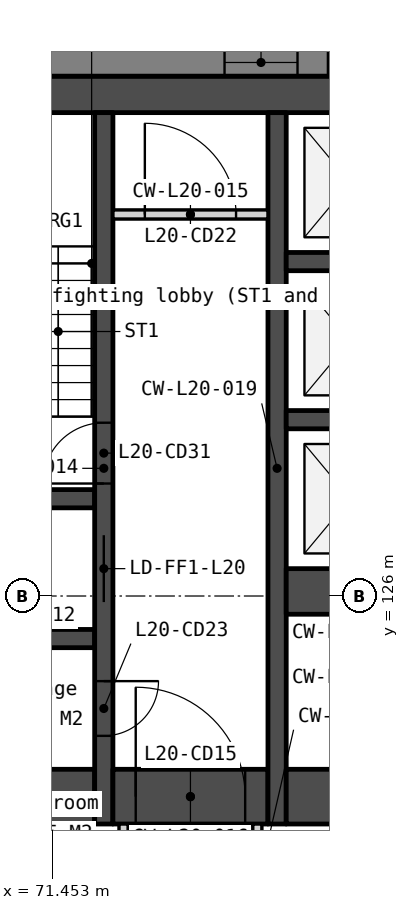
"""IFC4 building model, lengths in metres.
Left out: names, types, materials, properties, quantities, classifications, styles, units other than length and angle.
Written with IfcOpenShell. Run it as: python <this file> out.ifc"""

import sys

from ifc_helpers import new_model, si_unit, direction, frame, frame_2d, origin, place, context, subcontext, project, spatial, polyline, rectangle, outline, extrude, element, fill, save


model = new_model("IFC4")
c1 = context("Model", 3, precision=1e-05, world=origin(), true_north=direction((0.0, 1.0)))
c2 = subcontext(c1, "Body", "Model", "MODEL_VIEW")
j1 = project(units=[si_unit("LENGTHUNIT", "METRE"), si_unit("PLANEANGLEUNIT", "RADIAN")], contexts=[c1])
p1 = place(None, origin())
s1 = spatial("IfcSite", under=j1, at=p1, CompositionType="ELEMENT")
p2 = place(p1, origin())
s2 = spatial("IfcBuilding", under=s1, at=p2, CompositionType="ELEMENT")
p3 = place(p2, frame((0.0, 0.0, 85.3)))
s3 = spatial("IfcBuildingStorey", under=s2, at=p3, CompositionType="ELEMENT", Elevation=85.3)
p4 = place(p3, frame((66.0, 134.25, 0.0), z_axis=(0.0, 0.0, 1.0), x_axis=(1.0, 0.0, 0.0)))
e1 = element("IfcWall", 1, at=p4, inside=s3, PredefinedType="SOLIDWALL", context=c2, shape_type="SweptSolid", body=[
    extrude(rectangle(XDim=28.0, YDim=0.6, at=frame_2d((14.0, 0.0))), origin(), (0.0, 0.0, 1.0), 3.35),
])
for number, where, z_axis, x_axis in (
    (2, (69.6, 127.6, 0.0), (0.0, 0.0, 1.0), (1.0, 0.0, 0.0)),
    (3, (69.6, 125.3, 0.0), (0.0, 0.0, 1.0), (1.0, 0.0, 0.0)),
):
    element("IfcWall", number, at=place(p3, frame(where, z_axis=z_axis, x_axis=x_axis)), inside=s3, PredefinedType="SOLIDWALL", context=c2, shape_type="SweptSolid", body=[
        extrude(rectangle(XDim=2.55, YDim=0.3, at=frame_2d((1.275, 0.0))), origin(), (0.0, 0.0, 1.0), 3.35),
    ])
p5 = place(p3, frame((69.6, 122.7, 0.0), z_axis=(0.0, 0.0, 1.0), x_axis=(1.0, 0.0, 0.0)))
e4 = element("IfcWall", 4, at=p5, inside=s3, PredefinedType="SOLIDWALL", context=c2, shape_type="SweptSolid", body=[
    extrude(rectangle(XDim=2.55, YDim=0.9, at=frame_2d((1.275, 0.0))), origin(), (0.0, 0.0, 1.0), 3.35),
])
p6 = place(p3, frame((72.3, 133.95, 0.0), z_axis=(0.0, 0.0, 1.0), x_axis=(0.0, -1.0, 0.0)))
e5 = element("IfcWall", 5, at=p6, inside=s3, PredefinedType="SOLIDWALL", context=c2, shape_type="SweptSolid", body=[
    extrude(rectangle(XDim=11.7, YDim=0.3, at=frame_2d((5.85, 0.0))), origin(), (0.0, 0.0, 1.0), 3.35),
])
p7 = place(p6, frame((6.95, 0.0, 0.0)))
e6 = element("IfcOpeningElement", 6, at=p7, cuts=e5, PredefinedType="OPENING", context=c2, shape_type="SweptSolid", body=[
    extrude(rectangle(XDim=1.1, YDim=2.1, at=frame_2d((0.55, 1.05))), frame((0.0, 0.16, 0.0), z_axis=(0.0, -1.0, 0.0), x_axis=(1.0, 0.0, 0.0)), (0.0, 0.0, 1.0), 0.32),
])
p8 = place(p6, frame((9.35, 0.0, 0.0)))
e7 = element("IfcOpeningElement", 7, at=p8, cuts=e5, PredefinedType="OPENING", context=c2, shape_type="SweptSolid", body=[
    extrude(rectangle(XDim=0.9, YDim=2.1, at=frame_2d((0.45, 1.05))), frame((0.0, 0.16, 0.0), z_axis=(0.0, -1.0, 0.0), x_axis=(1.0, 0.0, 0.0)), (0.0, 0.0, 1.0), 0.32),
])
p9 = place(p6, frame((5.1, 0.0, 0.0)))
e8 = element("IfcOpeningElement", 8, at=p9, cuts=e5, PredefinedType="OPENING", context=c2, shape_type="SweptSolid", body=[
    extrude(rectangle(XDim=1.0, YDim=2.1, at=frame_2d((0.5, 1.05))), frame((0.0, 0.16, 0.0), z_axis=(0.0, -1.0, 0.0), x_axis=(1.0, 0.0, 0.0)), (0.0, 0.0, 1.0), 0.32),
])
p10 = place(p3, frame((72.45, 132.275, 0.0), z_axis=(0.0, 0.0, 1.0), x_axis=(1.0, 0.0, 0.0)))
e9 = element("IfcWall", 9, at=p10, inside=s3, PredefinedType="PARTITIONING", context=c2, shape_type="SweptSolid", body=[
    extrude(rectangle(XDim=2.55, YDim=0.15, at=frame_2d((1.275, 0.0))), origin(), (0.0, 0.0, 1.0), 3.35),
])
p11 = place(p10, frame((0.525, 0.0, 0.0)))
e10 = element("IfcOpeningElement", 10, at=p11, cuts=e9, PredefinedType="OPENING", context=c2, shape_type="SweptSolid", body=[
    extrude(rectangle(XDim=1.5, YDim=2.1, at=frame_2d((0.75, 1.05))), frame((0.0, 0.085, 0.0), z_axis=(0.0, -1.0, 0.0), x_axis=(1.0, 0.0, 0.0)), (0.0, 0.0, 1.0), 0.17),
])
p12 = place(p3, frame((72.45, 122.7, 0.0), z_axis=(0.0, 0.0, 1.0), x_axis=(1.0, 0.0, 0.0)))
e11 = element("IfcWall", 11, at=p12, inside=s3, PredefinedType="SOLIDWALL", context=c2, shape_type="SweptSolid", body=[
    extrude(rectangle(XDim=2.55, YDim=0.9, at=frame_2d((1.275, 0.0))), origin(), (0.0, 0.0, 1.0), 3.35),
])
p13 = place(p12, frame((0.375, 0.0, 0.0)))
e12 = element("IfcOpeningElement", 12, at=p13, cuts=e11, PredefinedType="OPENING", context=c2, shape_type="SweptSolid", body=[
    extrude(rectangle(XDim=1.8, YDim=2.1, at=frame_2d((0.9, 1.05))), frame((0.0, 0.46, 0.0), z_axis=(0.0, -1.0, 0.0), x_axis=(1.0, 0.0, 0.0)), (0.0, 0.0, 1.0), 0.92),
])
for number, where, z_axis, x_axis in (
    (13, (72.625, 122.25, 0.0), (0.0, 0.0, 1.0), (0.0, -1.0, 0.0)),
    (14, (74.825, 122.25, 0.0), (0.0, 0.0, 1.0), (0.0, -1.0, 0.0)),
):
    element("IfcWall", number, at=place(p3, frame(where, z_axis=z_axis, x_axis=x_axis)), inside=s3, PredefinedType="PARTITIONING", context=c2, shape_type="SweptSolid", body=[
        extrude(rectangle(XDim=2.1, YDim=0.15, at=frame_2d((1.05, 0.0))), origin(), (0.0, 0.0, 1.0), 3.35),
    ])
p14 = place(p3, frame((75.15, 133.95, 0.0), z_axis=(0.0, 0.0, 1.0), x_axis=(0.0, -1.0, 0.0)))
e15 = element("IfcWall", 15, at=p14, inside=s3, PredefinedType="SOLIDWALL", context=c2, shape_type="SweptSolid", body=[
    extrude(rectangle(XDim=11.7, YDim=0.3, at=frame_2d((5.85, 0.0))), origin(), (0.0, 0.0, 1.0), 3.35),
])
for number, where, z_axis, x_axis in (
    (16, (75.3, 131.5, 0.0), (0.0, 0.0, 1.0), (1.0, 0.0, 0.0)),
    (17, (75.3, 128.9, 0.0), (0.0, 0.0, 1.0), (1.0, 0.0, 0.0)),
):
    element("IfcWall", number, at=place(p3, frame(where, z_axis=z_axis, x_axis=x_axis)), inside=s3, PredefinedType="SOLIDWALL", context=c2, shape_type="SweptSolid", body=[
        extrude(rectangle(XDim=2.1, YDim=0.3, at=frame_2d((1.05, 0.0))), origin(), (0.0, 0.0, 1.0), 3.35),
    ])
p15 = place(p3, frame((75.3, 126.075, 0.0), z_axis=(0.0, 0.0, 1.0), x_axis=(1.0, 0.0, 0.0)))
e18 = element("IfcWall", 18, at=p15, inside=s3, PredefinedType="SOLIDWALL", context=c2, shape_type="SweptSolid", body=[
    extrude(rectangle(XDim=2.1, YDim=0.75, at=frame_2d((1.05, 0.0))), origin(), (0.0, 0.0, 1.0), 3.35),
])
p16 = place(p3, frame((75.3, 122.7, 0.0), z_axis=(0.0, 0.0, 1.0), x_axis=(1.0, 0.0, 0.0)))
e19 = element("IfcWall", 19, at=p16, inside=s3, PredefinedType="SOLIDWALL", context=c2, shape_type="SweptSolid", body=[
    extrude(rectangle(XDim=6.2, YDim=0.9, at=frame_2d((3.1, 0.0))), origin(), (0.0, 0.0, 1.0), 3.35),
])
p17 = place(p3, frame((101.322, 134.775, -0.15), z_axis=(0.0, 0.0, 1.0), x_axis=(-1.0, 0.0, 0.0)))
e20 = element("IfcWall", 20, at=p17, inside=s3, PredefinedType="SOLIDWALL", context=c2, shape_type="SweptSolid", body=[
    extrude(outline(polyline([(42.643, 0.0), (42.643, 3.5), (0.0, 3.5), (0.0, 0.0), (42.643, 0.0)])), frame((0.0, 0.225, 0.0), z_axis=(0.0, -1.0, 0.0), x_axis=(1.0, 0.0, 0.0)), (0.0, 0.0, 1.0), 0.45),
])
p18 = place(p17, frame((7.079, 0.0, 1.05)))
e21 = element("IfcOpeningElement", 21, at=p18, cuts=e20, PredefinedType="OPENING", context=c2, shape_type="SweptSolid", body=[
    extrude(rectangle(XDim=1.2, YDim=1.5, at=frame_2d((0.6, 0.75))), frame((0.0, 0.235, 0.0), z_axis=(0.0, -1.0, 0.0), x_axis=(1.0, 0.0, 0.0)), (0.0, 0.0, 1.0), 0.47),
])
p19 = place(p17, frame((8.779, 0.0, 1.05)))
e22 = element("IfcOpeningElement", 22, at=p19, cuts=e20, PredefinedType="OPENING", context=c2, shape_type="SweptSolid", body=[
    extrude(rectangle(XDim=1.2, YDim=1.5, at=frame_2d((0.6, 0.75))), frame((0.0, 0.235, 0.0), z_axis=(0.0, -1.0, 0.0), x_axis=(1.0, 0.0, 0.0)), (0.0, 0.0, 1.0), 0.47),
])
p20 = place(p17, frame((15.607, 0.0, 1.05)))
e23 = element("IfcOpeningElement", 23, at=p20, cuts=e20, PredefinedType="OPENING", context=c2, shape_type="SweptSolid", body=[
    extrude(rectangle(XDim=1.2, YDim=1.5, at=frame_2d((0.6, 0.75))), frame((0.0, 0.235, 0.0), z_axis=(0.0, -1.0, 0.0), x_axis=(1.0, 0.0, 0.0)), (0.0, 0.0, 1.0), 0.47),
])
p21 = place(p17, frame((17.307, 0.0, 1.05)))
e24 = element("IfcOpeningElement", 24, at=p21, cuts=e20, PredefinedType="OPENING", context=c2, shape_type="SweptSolid", body=[
    extrude(rectangle(XDim=1.2, YDim=1.5, at=frame_2d((0.6, 0.75))), frame((0.0, 0.235, 0.0), z_axis=(0.0, -1.0, 0.0), x_axis=(1.0, 0.0, 0.0)), (0.0, 0.0, 1.0), 0.47),
])
p22 = place(p17, frame((24.136, 0.0, 1.05)))
e25 = element("IfcOpeningElement", 25, at=p22, cuts=e20, PredefinedType="OPENING", context=c2, shape_type="SweptSolid", body=[
    extrude(rectangle(XDim=1.2, YDim=1.5, at=frame_2d((0.6, 0.75))), frame((0.0, 0.235, 0.0), z_axis=(0.0, -1.0, 0.0), x_axis=(1.0, 0.0, 0.0)), (0.0, 0.0, 1.0), 0.47),
])
p23 = place(p17, frame((25.836, 0.0, 1.05)))
e26 = element("IfcOpeningElement", 26, at=p23, cuts=e20, PredefinedType="OPENING", context=c2, shape_type="SweptSolid", body=[
    extrude(rectangle(XDim=1.2, YDim=1.5, at=frame_2d((0.6, 0.75))), frame((0.0, 0.235, 0.0), z_axis=(0.0, -1.0, 0.0), x_axis=(1.0, 0.0, 0.0)), (0.0, 0.0, 1.0), 0.47),
])
p24 = place(p17, frame((32.665, 0.0, 1.05)))
e27 = element("IfcOpeningElement", 27, at=p24, cuts=e20, PredefinedType="OPENING", context=c2, shape_type="SweptSolid", body=[
    extrude(rectangle(XDim=1.2, YDim=1.5, at=frame_2d((0.6, 0.75))), frame((0.0, 0.235, 0.0), z_axis=(0.0, -1.0, 0.0), x_axis=(1.0, 0.0, 0.0)), (0.0, 0.0, 1.0), 0.47),
])
p25 = place(p17, frame((34.365, 0.0, 1.05)))
e28 = element("IfcOpeningElement", 28, at=p25, cuts=e20, PredefinedType="OPENING", context=c2, shape_type="SweptSolid", body=[
    extrude(rectangle(XDim=1.2, YDim=1.5, at=frame_2d((0.6, 0.75))), frame((0.0, 0.235, 0.0), z_axis=(0.0, -1.0, 0.0), x_axis=(1.0, 0.0, 0.0)), (0.0, 0.0, 1.0), 0.47),
])
p26 = place(p3, frame((56.073, 130.263, -0.15), z_axis=(0.0, 0.0, 1.0), x_axis=(0.500000478905, -0.866025127289, 0.0)))
e29 = element("IfcWall", 29, at=p26, inside=s3, PredefinedType="SOLIDWALL", context=c2, shape_type="SweptSolid", body=[
    extrude(outline(polyline([(42.643, 0.0), (42.643, 3.5), (0.0, 3.5), (0.0, 0.0), (42.643, 0.0)])), frame((0.0, 0.225, 0.0), z_axis=(0.0, -1.0, 0.0), x_axis=(1.0, 0.0, 0.0)), (0.0, 0.0, 1.0), 0.45),
])
p27 = place(p26, frame((7.079, 0.0, 1.05)))
e30 = element("IfcOpeningElement", 30, at=p27, cuts=e29, PredefinedType="OPENING", context=c2, shape_type="SweptSolid", body=[
    extrude(rectangle(XDim=1.2, YDim=1.5, at=frame_2d((0.6, 0.75))), frame((0.0, 0.235, 0.0), z_axis=(0.0, -1.0, 0.0), x_axis=(1.0, 0.0, 0.0)), (0.0, 0.0, 1.0), 0.47),
])
p28 = place(p26, frame((8.779, 0.0, 1.05)))
e31 = element("IfcOpeningElement", 31, at=p28, cuts=e29, PredefinedType="OPENING", context=c2, shape_type="SweptSolid", body=[
    extrude(rectangle(XDim=1.2, YDim=1.5, at=frame_2d((0.6, 0.75))), frame((0.0, 0.235, 0.0), z_axis=(0.0, -1.0, 0.0), x_axis=(1.0, 0.0, 0.0)), (0.0, 0.0, 1.0), 0.47),
])
p29 = place(p26, frame((15.607, 0.0, 1.05)))
e32 = element("IfcOpeningElement", 32, at=p29, cuts=e29, PredefinedType="OPENING", context=c2, shape_type="SweptSolid", body=[
    extrude(rectangle(XDim=1.2, YDim=1.5, at=frame_2d((0.6, 0.75))), frame((0.0, 0.235, 0.0), z_axis=(0.0, -1.0, 0.0), x_axis=(1.0, 0.0, 0.0)), (0.0, 0.0, 1.0), 0.47),
])
p30 = place(p26, frame((17.307, 0.0, 1.05)))
e33 = element("IfcOpeningElement", 33, at=p30, cuts=e29, PredefinedType="OPENING", context=c2, shape_type="SweptSolid", body=[
    extrude(rectangle(XDim=1.2, YDim=1.5, at=frame_2d((0.6, 0.75))), frame((0.0, 0.235, 0.0), z_axis=(0.0, -1.0, 0.0), x_axis=(1.0, 0.0, 0.0)), (0.0, 0.0, 1.0), 0.47),
])
p31 = place(p26, frame((24.136, 0.0, 1.05)))
e34 = element("IfcOpeningElement", 34, at=p31, cuts=e29, PredefinedType="OPENING", context=c2, shape_type="SweptSolid", body=[
    extrude(rectangle(XDim=1.2, YDim=1.5, at=frame_2d((0.6, 0.75))), frame((0.0, 0.235, 0.0), z_axis=(0.0, -1.0, 0.0), x_axis=(1.0, 0.0, 0.0)), (0.0, 0.0, 1.0), 0.47),
])
p32 = place(p26, frame((25.836, 0.0, 1.05)))
e35 = element("IfcOpeningElement", 35, at=p32, cuts=e29, PredefinedType="OPENING", context=c2, shape_type="SweptSolid", body=[
    extrude(rectangle(XDim=1.2, YDim=1.5, at=frame_2d((0.6, 0.75))), frame((0.0, 0.235, 0.0), z_axis=(0.0, -1.0, 0.0), x_axis=(1.0, 0.0, 0.0)), (0.0, 0.0, 1.0), 0.47),
])
p33 = place(p26, frame((32.665, 0.0, 1.05)))
e36 = element("IfcOpeningElement", 36, at=p33, cuts=e29, PredefinedType="OPENING", context=c2, shape_type="SweptSolid", body=[
    extrude(rectangle(XDim=1.2, YDim=1.5, at=frame_2d((0.6, 0.75))), frame((0.0, 0.235, 0.0), z_axis=(0.0, -1.0, 0.0), x_axis=(1.0, 0.0, 0.0)), (0.0, 0.0, 1.0), 0.47),
])
p34 = place(p26, frame((34.365, 0.0, 1.05)))
e37 = element("IfcOpeningElement", 37, at=p34, cuts=e29, PredefinedType="OPENING", context=c2, shape_type="SweptSolid", body=[
    extrude(rectangle(XDim=1.2, YDim=1.5, at=frame_2d((0.6, 0.75))), frame((0.0, 0.235, 0.0), z_axis=(0.0, -1.0, 0.0), x_axis=(1.0, 0.0, 0.0)), (0.0, 0.0, 1.0), 0.47),
])
p35 = place(p7, origin())
e38 = element("IfcDoor", 38, at=p35, inside=s3, OperationType="SLIDING_TO_LEFT", PredefinedType="DOOR", context=c2, shape_type="SweptSolid", body=[
    extrude(rectangle(XDim=1.1, YDim=2.1, at=frame_2d((0.55, 1.05))), frame((0.0, 0.025, 0.0), z_axis=(0.0, -1.0, 0.0), x_axis=(1.0, 0.0, 0.0)), (0.0, 0.0, 1.0), 0.05),
])
fill(e6, e38)
p36 = place(p13, origin())
e39 = element("IfcDoor", 39, at=p36, inside=s3, OperationType="DOUBLE_DOOR_DOUBLE_SWING", PredefinedType="DOOR", context=c2, shape_type="SweptSolid", body=[
    extrude(rectangle(XDim=1.8, YDim=2.1, at=frame_2d((0.9, 1.05))), frame((0.0, 0.025, 0.0), z_axis=(0.0, -1.0, 0.0), x_axis=(1.0, 0.0, 0.0)), (0.0, 0.0, 1.0), 0.05),
])
fill(e12, e39)
p37 = place(p11, origin())
e40 = element("IfcDoor", 40, at=p37, inside=s3, OperationType="DOUBLE_DOOR_DOUBLE_SWING", PredefinedType="DOOR", context=c2, shape_type="SweptSolid", body=[
    extrude(rectangle(XDim=1.5, YDim=2.1, at=frame_2d((0.75, 1.05))), frame((0.0, 0.025, 0.0), z_axis=(0.0, -1.0, 0.0), x_axis=(1.0, 0.0, 0.0)), (0.0, 0.0, 1.0), 0.05),
])
fill(e10, e40)
p38 = place(p8, origin())
e41 = element("IfcDoor", 41, at=p38, inside=s3, OperationType="SINGLE_SWING_LEFT", PredefinedType="DOOR", context=c2, shape_type="SweptSolid", body=[
    extrude(rectangle(XDim=0.9, YDim=2.1, at=frame_2d((0.45, 1.05))), frame((0.0, 0.025, 0.0), z_axis=(0.0, -1.0, 0.0), x_axis=(1.0, 0.0, 0.0)), (0.0, 0.0, 1.0), 0.05),
])
fill(e7, e41)
p39 = place(p9, origin())
e42 = element("IfcDoor", 42, at=p39, inside=s3, OperationType="SINGLE_SWING_RIGHT", PredefinedType="DOOR", context=c2, shape_type="SweptSolid", body=[
    extrude(rectangle(XDim=1.0, YDim=2.1, at=frame_2d((0.5, 1.05))), frame((0.0, 0.025, 0.0), z_axis=(0.0, -1.0, 0.0), x_axis=(1.0, 0.0, 0.0)), (0.0, 0.0, 1.0), 0.05),
])
fill(e8, e42)
p40 = place(p22, origin())
e43 = element("IfcWindow", 43, at=p40, inside=s3, PartitioningType="SINGLE_PANEL", PredefinedType="WINDOW", context=c2, shape_type="SweptSolid", body=[
    extrude(rectangle(XDim=1.2, YDim=1.5, at=frame_2d((0.6, 0.75))), frame((0.0, 0.03, 0.0), z_axis=(0.0, -1.0, 0.0), x_axis=(1.0, 0.0, 0.0)), (0.0, 0.0, 1.0), 0.06),
])
fill(e25, e43)
p41 = place(p23, origin())
e44 = element("IfcWindow", 44, at=p41, inside=s3, PartitioningType="SINGLE_PANEL", PredefinedType="WINDOW", context=c2, shape_type="SweptSolid", body=[
    extrude(rectangle(XDim=1.2, YDim=1.5, at=frame_2d((0.6, 0.75))), frame((0.0, 0.03, 0.0), z_axis=(0.0, -1.0, 0.0), x_axis=(1.0, 0.0, 0.0)), (0.0, 0.0, 1.0), 0.06),
])
fill(e26, e44)
save(model, sys.argv[1])
